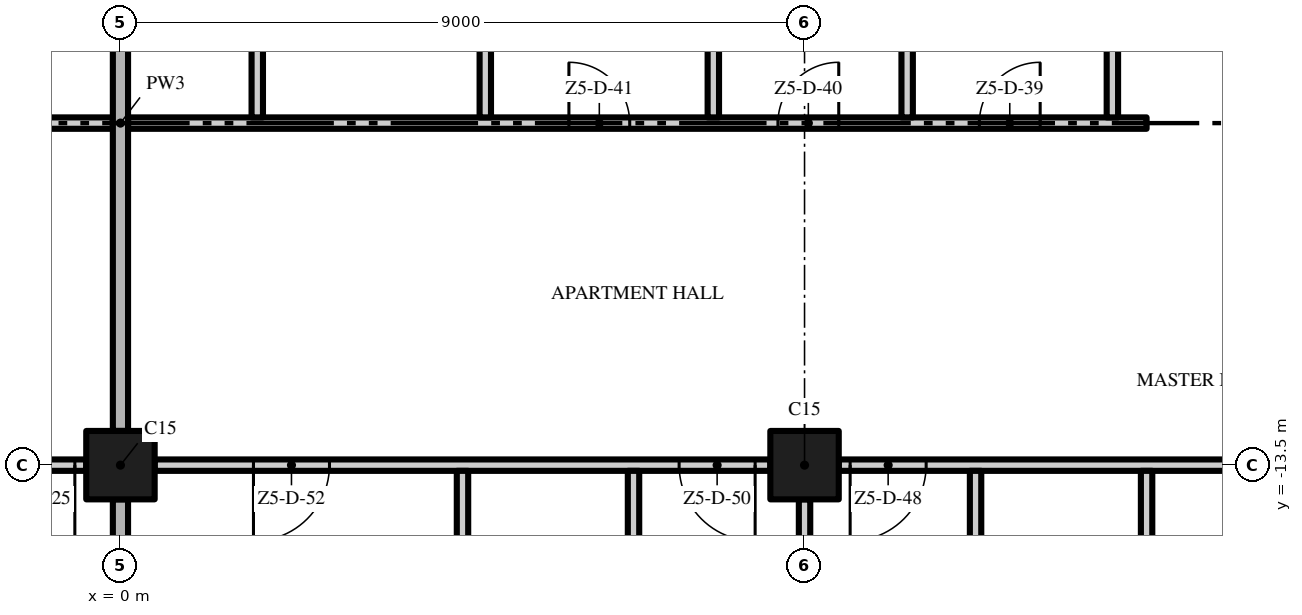
"""IFC4 building model, lengths in metres.
Left out: names, types, materials, properties, quantities, classifications, styles, units other than length and angle.
Written with IfcOpenShell. Run it as: python <this file> out.ifc"""

import sys

from ifc_helpers import new_model, si_unit, direction, frame, frame_2d, origin, origin_2d, place, context, subcontext, project, spatial, rectangle, extrude, element, fill, save


model = new_model("IFC4")
c1 = context("Model", 3, precision=1e-05, world=origin(), true_north=direction((0.0, 1.0)))
c2 = subcontext(c1, "Body", "Model", "MODEL_VIEW")
j1 = project(units=[si_unit("LENGTHUNIT", "METRE"), si_unit("PLANEANGLEUNIT", "RADIAN")], contexts=[c1])
p1 = place(None, origin())
s1 = spatial("IfcSite", under=j1, at=p1, CompositionType="ELEMENT")
p2 = place(p1, origin())
s2 = spatial("IfcBuilding", under=s1, at=p2, CompositionType="ELEMENT")
p3 = place(p2, frame((0.0, 0.0, 280.6)))
s3 = spatial("IfcBuildingStorey", under=s2, at=p3, CompositionType="ELEMENT", Elevation=280.6)
for number, where, z_axis, x_axis in (
    (1, (0.0, -13.5, 0.0), (0.0, 0.0, 1.0), (1.0, 0.0, 0.0)),
    (2, (9.0, -13.5, 0.0), (0.0, 0.0, 1.0), (1.0, 0.0, 0.0)),
):
    element("IfcColumn", number, at=place(p3, frame(where, z_axis=z_axis, x_axis=x_axis)), inside=s3, PredefinedType="COLUMN", context=c2, shape_type="SweptSolid", body=[
        extrude(rectangle(XDim=0.9, YDim=0.9, at=origin_2d()), origin(), (0.0, 0.0, 1.0), 3.5),
    ])
p4 = place(p3, frame((-0.45, -13.5, 0.0), z_axis=(0.0, 0.0, 1.0), x_axis=(-1.0, 0.0, 0.0)))
e3 = element("IfcWall", 3, at=p4, inside=s3, PredefinedType="PARTITIONING", context=c2, shape_type="SweptSolid", body=[
    extrude(rectangle(XDim=8.1, YDim=0.15, at=frame_2d((4.05, 0.0))), origin(), (0.0, 0.0, 1.0), 3.5),
])
p5 = place(p4, frame((0.15, 0.0, 0.0)))
e4 = element("IfcOpeningElement", 4, at=p5, cuts=e3, PredefinedType="OPENING", context=c2, shape_type="SweptSolid", body=[
    extrude(rectangle(XDim=1.0, YDim=2.4, at=frame_2d((0.5, 1.2))), frame((0.0, 0.085, 0.0), z_axis=(0.0, -1.0, 0.0), x_axis=(1.0, 0.0, 0.0)), (0.0, 0.0, 1.0), 0.17),
])
p6 = place(p4, frame((6.9, 0.0, 0.0)))
e5 = element("IfcOpeningElement", 5, at=p6, cuts=e3, PredefinedType="OPENING", context=c2, shape_type="SweptSolid", body=[
    extrude(rectangle(XDim=1.0, YDim=2.4, at=frame_2d((0.5, 1.2))), frame((0.0, 0.085, 0.0), z_axis=(0.0, -1.0, 0.0), x_axis=(1.0, 0.0, 0.0)), (0.0, 0.0, 1.0), 0.17),
])
p7 = place(p3, frame((8.55, -13.5, 0.0), z_axis=(0.0, 0.0, 1.0), x_axis=(-1.0, 0.0, 0.0)))
e6 = element("IfcWall", 6, at=p7, inside=s3, PredefinedType="PARTITIONING", context=c2, shape_type="SweptSolid", body=[
    extrude(rectangle(XDim=8.1, YDim=0.15, at=frame_2d((4.05, 0.0))), origin(), (0.0, 0.0, 1.0), 3.5),
])
p8 = place(p7, frame((0.2, 0.0, 0.0)))
e7 = element("IfcOpeningElement", 7, at=p8, cuts=e6, PredefinedType="OPENING", context=c2, shape_type="SweptSolid", body=[
    extrude(rectangle(XDim=1.0, YDim=2.4, at=frame_2d((0.5, 1.2))), frame((0.0, 0.085, 0.0), z_axis=(0.0, -1.0, 0.0), x_axis=(1.0, 0.0, 0.0)), (0.0, 0.0, 1.0), 0.17),
])
p9 = place(p7, frame((5.8, 0.0, 0.0)))
e8 = element("IfcOpeningElement", 8, at=p9, cuts=e6, PredefinedType="OPENING", context=c2, shape_type="SweptSolid", body=[
    extrude(rectangle(XDim=1.0, YDim=2.4, at=frame_2d((0.5, 1.2))), frame((0.0, 0.085, 0.0), z_axis=(0.0, -1.0, 0.0), x_axis=(1.0, 0.0, 0.0)), (0.0, 0.0, 1.0), 0.17),
])
p10 = place(p3, frame((17.55, -13.5, 0.0), z_axis=(0.0, 0.0, 1.0), x_axis=(-1.0, 0.0, 0.0)))
e9 = element("IfcWall", 9, at=p10, inside=s3, PredefinedType="PARTITIONING", context=c2, shape_type="SweptSolid", body=[
    extrude(rectangle(XDim=8.1, YDim=0.15, at=frame_2d((4.05, 0.0))), origin(), (0.0, 0.0, 1.0), 3.5),
])
p11 = place(p10, frame((0.15, 0.0, 0.0)))
e10 = element("IfcOpeningElement", 10, at=p11, cuts=e9, PredefinedType="OPENING", context=c2, shape_type="SweptSolid", body=[
    extrude(rectangle(XDim=1.0, YDim=2.4, at=frame_2d((0.5, 1.2))), frame((0.0, 0.085, 0.0), z_axis=(0.0, -1.0, 0.0), x_axis=(1.0, 0.0, 0.0)), (0.0, 0.0, 1.0), 0.17),
])
p12 = place(p10, frame((6.95, 0.0, 0.0)))
e11 = element("IfcOpeningElement", 11, at=p12, cuts=e9, PredefinedType="OPENING", context=c2, shape_type="SweptSolid", body=[
    extrude(rectangle(XDim=1.0, YDim=2.4, at=frame_2d((0.5, 1.2))), frame((0.0, 0.085, 0.0), z_axis=(0.0, -1.0, 0.0), x_axis=(1.0, 0.0, 0.0)), (0.0, 0.0, 1.0), 0.17),
])
p13 = place(p3, frame((-13.425, -9.0, 0.0), z_axis=(0.0, 0.0, 1.0), x_axis=(1.0, 0.0, 0.0)))
e12 = element("IfcWall", 12, at=p13, inside=s3, PredefinedType="PARTITIONING", context=c2, shape_type="SweptSolid", body=[
    extrude(rectangle(XDim=13.325, YDim=0.15, at=frame_2d((6.662, 0.0))), origin(), (0.0, 0.0, 1.0), 3.5),
])
p14 = place(p13, frame((4.675, 0.0, 0.0)))
e13 = element("IfcOpeningElement", 13, at=p14, cuts=e12, PredefinedType="OPENING", context=c2, shape_type="SweptSolid", body=[
    extrude(rectangle(XDim=1.0, YDim=2.4, at=frame_2d((0.5, 1.2))), frame((0.0, 0.085, 0.0), z_axis=(0.0, -1.0, 0.0), x_axis=(1.0, 0.0, 0.0)), (0.0, 0.0, 1.0), 0.17),
])
p15 = place(p3, frame((0.1, -9.0, 0.0), z_axis=(0.0, 0.0, 1.0), x_axis=(1.0, 0.0, 0.0)))
e14 = element("IfcWall", 14, at=p15, inside=s3, PredefinedType="PARTITIONING", context=c2, shape_type="SweptSolid", body=[
    extrude(rectangle(XDim=13.4, YDim=0.15, at=frame_2d((6.7, 0.0))), origin(), (0.0, 0.0, 1.0), 3.5),
])
p16 = place(p15, frame((11.2, 0.0, 0.0)))
e15 = element("IfcOpeningElement", 15, at=p16, cuts=e14, PredefinedType="OPENING", context=c2, shape_type="SweptSolid", body=[
    extrude(rectangle(XDim=0.8, YDim=2.0, at=frame_2d((0.4, 1.0))), frame((0.0, 0.085, 0.0), z_axis=(0.0, -1.0, 0.0), x_axis=(1.0, 0.0, 0.0)), (0.0, 0.0, 1.0), 0.17),
])
p17 = place(p15, frame((8.55, 0.0, 0.0)))
e16 = element("IfcOpeningElement", 16, at=p17, cuts=e14, PredefinedType="OPENING", context=c2, shape_type="SweptSolid", body=[
    extrude(rectangle(XDim=0.8, YDim=2.0, at=frame_2d((0.4, 1.0))), frame((0.0, 0.085, 0.0), z_axis=(0.0, -1.0, 0.0), x_axis=(1.0, 0.0, 0.0)), (0.0, 0.0, 1.0), 0.17),
])
p18 = place(p15, frame((5.8, 0.0, 0.0)))
e17 = element("IfcOpeningElement", 17, at=p18, cuts=e14, PredefinedType="OPENING", context=c2, shape_type="SweptSolid", body=[
    extrude(rectangle(XDim=0.8, YDim=2.0, at=frame_2d((0.4, 1.0))), frame((0.0, 0.085, 0.0), z_axis=(0.0, -1.0, 0.0), x_axis=(1.0, 0.0, 0.0)), (0.0, 0.0, 1.0), 0.17),
])
p19 = place(p3, frame((0.0, -21.6, 0.0), z_axis=(0.0, 0.0, 1.0), x_axis=(0.0, 1.0, 0.0)))
e18 = element("IfcWall", 18, at=p19, inside=s3, PredefinedType="PARTITIONING", context=c2, shape_type="SweptSolid", body=[
    extrude(rectangle(XDim=7.65, YDim=0.2, at=frame_2d((3.825, 0.0))), origin(), (0.0, 0.0, 1.0), 3.5),
])
p20 = place(p3, frame((0.0, -13.05, 0.0), z_axis=(0.0, 0.0, 1.0), x_axis=(0.0, 1.0, 0.0)))
e19 = element("IfcWall", 19, at=p20, inside=s3, PredefinedType="PARTITIONING", context=c2, shape_type="SweptSolid", body=[
    extrude(rectangle(XDim=8.1, YDim=0.2, at=frame_2d((4.05, 0.0))), origin(), (0.0, 0.0, 1.0), 3.5),
])
p21 = place(p3, frame((1.8, -8.925, 0.0), z_axis=(0.0, 0.0, 1.0), x_axis=(0.0, 1.0, 0.0)))
e20 = element("IfcWall", 20, at=p21, inside=s3, PredefinedType="PARTITIONING", context=c2, shape_type="SweptSolid", body=[
    extrude(rectangle(XDim=4.35, YDim=0.15, at=frame_2d((2.175, 0.0))), origin(), (0.0, 0.0, 1.0), 3.5),
])
p22 = place(p3, frame((4.5, -22.2, 0.0), z_axis=(0.0, 0.0, 1.0), x_axis=(0.0, 1.0, 0.0)))
e21 = element("IfcWall", 21, at=p22, inside=s3, PredefinedType="PARTITIONING", context=c2, shape_type="SweptSolid", body=[
    extrude(rectangle(XDim=8.625, YDim=0.15, at=frame_2d((4.312, 0.0))), origin(), (0.0, 0.0, 1.0), 3.5),
])
p23 = place(p3, frame((4.8, -8.925, 0.0), z_axis=(0.0, 0.0, 1.0), x_axis=(0.0, 1.0, 0.0)))
e22 = element("IfcWall", 22, at=p23, inside=s3, PredefinedType="PARTITIONING", context=c2, shape_type="SweptSolid", body=[
    extrude(rectangle(XDim=4.35, YDim=0.15, at=frame_2d((2.175, 0.0))), origin(), (0.0, 0.0, 1.0), 3.5),
])
p24 = place(p3, frame((6.75, -16.575, 0.0), z_axis=(0.0, 0.0, 1.0), x_axis=(0.0, 1.0, 0.0)))
e23 = element("IfcWall", 23, at=p24, inside=s3, PredefinedType="PARTITIONING", context=c2, shape_type="SweptSolid", body=[
    extrude(rectangle(XDim=3.0, YDim=0.15, at=frame_2d((1.5, 0.0))), origin(), (0.0, 0.0, 1.0), 3.5),
])
p25 = place(p3, frame((7.8, -8.925, 0.0), z_axis=(0.0, 0.0, 1.0), x_axis=(0.0, 1.0, 0.0)))
e24 = element("IfcWall", 24, at=p25, inside=s3, PredefinedType="PARTITIONING", context=c2, shape_type="SweptSolid", body=[
    extrude(rectangle(XDim=4.35, YDim=0.15, at=frame_2d((2.175, 0.0))), origin(), (0.0, 0.0, 1.0), 3.5),
])
p26 = place(p3, frame((9.0, -21.6, 0.0), z_axis=(0.0, 0.0, 1.0), x_axis=(0.0, 1.0, 0.0)))
e25 = element("IfcWall", 25, at=p26, inside=s3, PredefinedType="PARTITIONING", context=c2, shape_type="SweptSolid", body=[
    extrude(rectangle(XDim=7.65, YDim=0.15, at=frame_2d((3.825, 0.0))), origin(), (0.0, 0.0, 1.0), 3.5),
])
p27 = place(p3, frame((10.35, -8.925, 0.0), z_axis=(0.0, 0.0, 1.0), x_axis=(0.0, 1.0, 0.0)))
e26 = element("IfcWall", 26, at=p27, inside=s3, PredefinedType="PARTITIONING", context=c2, shape_type="SweptSolid", body=[
    extrude(rectangle(XDim=4.35, YDim=0.15, at=frame_2d((2.175, 0.0))), origin(), (0.0, 0.0, 1.0), 3.5),
])
p28 = place(p3, frame((11.25, -16.575, 0.0), z_axis=(0.0, 0.0, 1.0), x_axis=(0.0, 1.0, 0.0)))
e27 = element("IfcWall", 27, at=p28, inside=s3, PredefinedType="PARTITIONING", context=c2, shape_type="SweptSolid", body=[
    extrude(rectangle(XDim=3.0, YDim=0.15, at=frame_2d((1.5, 0.0))), origin(), (0.0, 0.0, 1.0), 3.5),
])
p29 = place(p3, frame((13.05, -8.925, 0.0), z_axis=(0.0, 0.0, 1.0), x_axis=(0.0, 1.0, 0.0)))
e28 = element("IfcWall", 28, at=p29, inside=s3, PredefinedType="PARTITIONING", context=c2, shape_type="SweptSolid", body=[
    extrude(rectangle(XDim=4.5, YDim=0.15, at=frame_2d((2.25, 0.0))), origin(), (0.0, 0.0, 1.0), 3.5),
])
p30 = place(p3, frame((13.5, -22.2, 0.0), z_axis=(0.0, 0.0, 1.0), x_axis=(0.0, 1.0, 0.0)))
e29 = element("IfcWall", 29, at=p30, inside=s3, PredefinedType="PARTITIONING", context=c2, shape_type="SweptSolid", body=[
    extrude(rectangle(XDim=8.625, YDim=0.15, at=frame_2d((4.312, 0.0))), origin(), (0.0, 0.0, 1.0), 3.5),
])
p31 = place(p5, origin())
e30 = element("IfcDoor", 30, at=p31, inside=s3, OperationType="SINGLE_SWING_LEFT", PredefinedType="DOOR", context=c2, shape_type="SweptSolid", body=[
    extrude(rectangle(XDim=1.0, YDim=2.4, at=frame_2d((0.5, 1.2))), frame((0.0, 0.025, 0.0), z_axis=(0.0, -1.0, 0.0), x_axis=(1.0, 0.0, 0.0)), (0.0, 0.0, 1.0), 0.05),
])
fill(e4, e30)
p32 = place(p16, origin())
e31 = element("IfcDoor", 31, at=p32, inside=s3, OperationType="SINGLE_SWING_RIGHT", PredefinedType="DOOR", context=c2, shape_type="SweptSolid", body=[
    extrude(rectangle(XDim=0.8, YDim=2.0, at=frame_2d((0.4, 1.0))), frame((0.0, 0.025, 0.0), z_axis=(0.0, -1.0, 0.0), x_axis=(1.0, 0.0, 0.0)), (0.0, 0.0, 1.0), 0.05),
])
fill(e15, e31)
p33 = place(p17, origin())
e32 = element("IfcDoor", 32, at=p33, inside=s3, OperationType="SINGLE_SWING_RIGHT", PredefinedType="DOOR", context=c2, shape_type="SweptSolid", body=[
    extrude(rectangle(XDim=0.8, YDim=2.0, at=frame_2d((0.4, 1.0))), frame((0.0, 0.025, 0.0), z_axis=(0.0, -1.0, 0.0), x_axis=(1.0, 0.0, 0.0)), (0.0, 0.0, 1.0), 0.05),
])
fill(e16, e32)
p34 = place(p18, origin())
e33 = element("IfcDoor", 33, at=p34, inside=s3, OperationType="SINGLE_SWING_LEFT", PredefinedType="DOOR", context=c2, shape_type="SweptSolid", body=[
    extrude(rectangle(XDim=0.8, YDim=2.0, at=frame_2d((0.4, 1.0))), frame((0.0, 0.025, 0.0), z_axis=(0.0, -1.0, 0.0), x_axis=(1.0, 0.0, 0.0)), (0.0, 0.0, 1.0), 0.05),
])
fill(e17, e33)
p35 = place(p12, origin())
e34 = element("IfcDoor", 34, at=p35, inside=s3, OperationType="SINGLE_SWING_RIGHT", PredefinedType="DOOR", context=c2, shape_type="SweptSolid", body=[
    extrude(rectangle(XDim=1.0, YDim=2.4, at=frame_2d((0.5, 1.2))), frame((0.0, 0.025, 0.0), z_axis=(0.0, -1.0, 0.0), x_axis=(1.0, 0.0, 0.0)), (0.0, 0.0, 1.0), 0.05),
])
fill(e11, e34)
p36 = place(p8, origin())
e35 = element("IfcDoor", 35, at=p36, inside=s3, OperationType="SINGLE_SWING_LEFT", PredefinedType="DOOR", context=c2, shape_type="SweptSolid", body=[
    extrude(rectangle(XDim=1.0, YDim=2.4, at=frame_2d((0.5, 1.2))), frame((0.0, 0.025, 0.0), z_axis=(0.0, -1.0, 0.0), x_axis=(1.0, 0.0, 0.0)), (0.0, 0.0, 1.0), 0.05),
])
fill(e7, e35)
p37 = place(p9, origin())
e36 = element("IfcDoor", 36, at=p37, inside=s3, OperationType="SINGLE_SWING_RIGHT", PredefinedType="DOOR", context=c2, shape_type="SweptSolid", body=[
    extrude(rectangle(XDim=1.0, YDim=2.4, at=frame_2d((0.5, 1.2))), frame((0.0, 0.025, 0.0), z_axis=(0.0, -1.0, 0.0), x_axis=(1.0, 0.0, 0.0)), (0.0, 0.0, 1.0), 0.05),
])
fill(e8, e36)
save(model, sys.argv[1])
